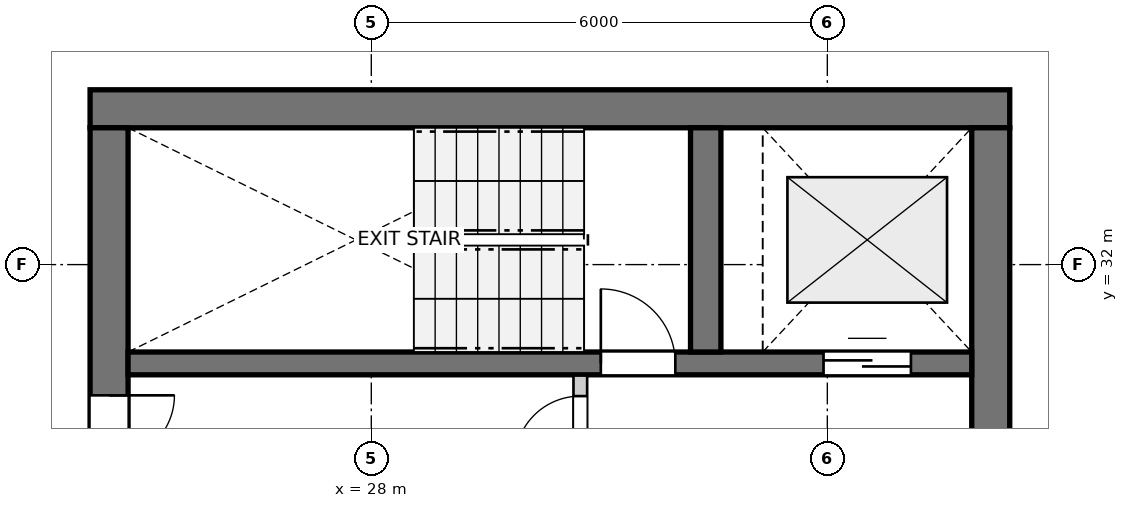
"""IFC4 building model, lengths in metres.
Left out: names, types, materials, properties, quantities, classifications, styles, units other than length and angle.
Written with IfcOpenShell. Run it as: python <this file> out.ifc"""

import sys

from ifc_helpers import new_model, si_unit, direction, frame, frame_2d, origin, place, context, subcontext, project, spatial, rectangle, extrude, source, transform, mapped, element, fill, save


model = new_model("IFC4")
c1 = context("Model", 3, precision=1e-05, world=origin(), true_north=direction((0.0, 1.0)))
c2 = subcontext(c1, "Body", "Model", "MODEL_VIEW")
j1 = project(units=[si_unit("LENGTHUNIT", "METRE"), si_unit("PLANEANGLEUNIT", "RADIAN")], contexts=[c1])
p1 = place(None, origin())
s1 = spatial("IfcSite", under=j1, at=p1, CompositionType="ELEMENT")
p2 = place(p1, origin())
s2 = spatial("IfcBuilding", under=s1, at=p2, CompositionType="ELEMENT")
p3 = place(p2, frame((0.0, 0.0, 224.4)))
s3 = spatial("IfcBuildingStorey", under=s2, at=p3, CompositionType="ELEMENT", Elevation=224.4)
p4 = place(p3, frame((36.4, 34.05, 0.0), z_axis=(0.0, 0.0, 1.0), x_axis=(-1.0, 0.0, 0.0)))
e1 = element("IfcWall", 1, at=p4, inside=s3, PredefinedType="SHEAR", context=c2, shape_type="SweptSolid", body=[
    extrude(rectangle(XDim=12.1, YDim=0.5, at=frame_2d((6.05, 0.0))), origin(), (0.0, 0.0, 1.0), 2.96),
])
p5 = place(p3, frame((24.55, 33.8, 0.0), z_axis=(0.0, 0.0, 1.0), x_axis=(0.0, -1.0, 0.0)))
e2 = element("IfcWall", 2, at=p5, inside=s3, PredefinedType="SHEAR", context=c2, shape_type="SweptSolid", body=[
    extrude(rectangle(XDim=15.6, YDim=0.5, at=frame_2d((7.8, 0.0))), origin(), (0.0, 0.0, 1.0), 2.96),
])
p6 = place(p5, frame((7.05, 0.0, 0.0)))
e3 = element("IfcOpeningElement", 3, at=p6, cuts=e2, PredefinedType="OPENING", context=c2, shape_type="SweptSolid", body=[
    extrude(rectangle(XDim=1.5, YDim=2.15, at=frame_2d((0.75, 1.075))), frame((0.0, 0.26, 0.0), z_axis=(0.0, -1.0, 0.0), x_axis=(1.0, 0.0, 0.0)), (0.0, 0.0, 1.0), 0.52),
])
p7 = place(p5, frame((3.52, 0.0, 0.0)))
e4 = element("IfcOpeningElement", 4, at=p7, cuts=e2, PredefinedType="OPENING", context=c2, shape_type="SweptSolid", body=[
    extrude(rectangle(XDim=0.86, YDim=2.05, at=frame_2d((0.43, 1.025))), frame((0.0, 0.26, 0.0), z_axis=(0.0, -1.0, 0.0), x_axis=(1.0, 0.0, 0.0)), (0.0, 0.0, 1.0), 0.52),
])
p8 = place(p5, frame((11.22, 0.0, 0.0)))
e5 = element("IfcOpeningElement", 5, at=p8, cuts=e2, PredefinedType="OPENING", context=c2, shape_type="SweptSolid", body=[
    extrude(rectangle(XDim=0.86, YDim=2.05, at=frame_2d((0.43, 1.025))), frame((0.0, 0.26, 0.0), z_axis=(0.0, -1.0, 0.0), x_axis=(1.0, 0.0, 0.0)), (0.0, 0.0, 1.0), 0.52),
])
p9 = place(p3, frame((36.15, 18.2, 0.0), z_axis=(0.0, 0.0, 1.0), x_axis=(0.0, 1.0, 0.0)))
e6 = element("IfcWall", 6, at=p9, inside=s3, PredefinedType="SHEAR", context=c2, shape_type="SweptSolid", body=[
    extrude(rectangle(XDim=15.6, YDim=0.5, at=frame_2d((7.8, 0.0))), origin(), (0.0, 0.0, 1.0), 2.96),
])
p10 = place(p9, frame((4.25, 0.0, 0.0)))
e7 = element("IfcOpeningElement", 7, at=p10, cuts=e6, PredefinedType="OPENING", context=c2, shape_type="SweptSolid", body=[
    extrude(rectangle(XDim=1.1, YDim=2.15, at=frame_2d((0.55, 1.075))), frame((0.0, 0.26, 0.0), z_axis=(0.0, -1.0, 0.0), x_axis=(1.0, 0.0, 0.0)), (0.0, 0.0, 1.0), 0.52),
])
p11 = place(p9, frame((10.25, 0.0, 0.0)))
e8 = element("IfcOpeningElement", 8, at=p11, cuts=e6, PredefinedType="OPENING", context=c2, shape_type="SweptSolid", body=[
    extrude(rectangle(XDim=1.1, YDim=2.15, at=frame_2d((0.55, 1.075))), frame((0.0, 0.26, 0.0), z_axis=(0.0, -1.0, 0.0), x_axis=(1.0, 0.0, 0.0)), (0.0, 0.0, 1.0), 0.52),
])
p12 = place(p3, frame((24.8, 30.7, 0.0), z_axis=(0.0, 0.0, 1.0), x_axis=(1.0, 0.0, 0.0)))
e9 = element("IfcWall", 9, at=p12, inside=s3, PredefinedType="SHEAR", context=c2, shape_type="SweptSolid", body=[
    extrude(rectangle(XDim=11.1, YDim=0.3, at=frame_2d((5.55, 0.0))), origin(), (0.0, 0.0, 1.0), 2.96),
])
p13 = place(p12, frame((6.22, 0.0, 0.0)))
e10 = element("IfcOpeningElement", 10, at=p13, cuts=e9, PredefinedType="OPENING", context=c2, shape_type="SweptSolid", body=[
    extrude(rectangle(XDim=0.98, YDim=2.15, at=frame_2d((0.49, 1.075))), frame((0.0, 0.16, 0.0), z_axis=(0.0, -1.0, 0.0), x_axis=(1.0, 0.0, 0.0)), (0.0, 0.0, 1.0), 0.32),
])
p14 = place(p12, frame((9.15, 0.0, 0.0)))
e11 = element("IfcOpeningElement", 11, at=p14, cuts=e9, PredefinedType="OPENING", context=c2, shape_type="SweptSolid", body=[
    extrude(rectangle(XDim=1.15, YDim=2.15, at=frame_2d((0.575, 1.075))), frame((0.0, 0.16, 0.0), z_axis=(0.0, -1.0, 0.0), x_axis=(1.0, 0.0, 0.0)), (0.0, 0.0, 1.0), 0.32),
])
p15 = place(p3, frame((32.4, 30.85, 0.0), z_axis=(0.0, 0.0, 1.0), x_axis=(0.0, 1.0, 0.0)))
e12 = element("IfcWall", 12, at=p15, inside=s3, PredefinedType="SHEAR", context=c2, shape_type="SweptSolid", body=[
    extrude(rectangle(XDim=2.95, YDim=0.4, at=frame_2d((1.475, 0.0))), origin(), (0.0, 0.0, 1.0), 2.96),
])
p16 = place(p3, frame((30.75, 27.43, 0.0), z_axis=(0.0, 0.0, 1.0), x_axis=(0.0, 1.0, 0.0)))
e13 = element("IfcWall", 13, at=p16, inside=s3, PredefinedType="PARTITIONING", context=c2, shape_type="SweptSolid", body=[
    extrude(rectangle(XDim=3.11, YDim=0.18, at=frame_2d((1.555, 0.0))), origin(), (0.0, 0.0, 1.0), 2.96),
])
p17 = place(p16, frame((1.98, 0.0, 0.0)))
e14 = element("IfcOpeningElement", 14, at=p17, cuts=e13, PredefinedType="OPENING", context=c2, shape_type="SweptSolid", body=[
    extrude(rectangle(XDim=0.86, YDim=2.05, at=frame_2d((0.43, 1.025))), frame((0.0, 0.1, 0.0), z_axis=(0.0, -1.0, 0.0), x_axis=(1.0, 0.0, 0.0)), (0.0, 0.0, 1.0), 0.2),
])
m1 = source(origin(), c2, "Body", "SweptSolid", [
    extrude(rectangle(XDim=0.98, YDim=2.15, at=frame_2d((0.49, 1.075))), frame((0.0, 0.025, 0.0), z_axis=(0.0, -1.0, 0.0), x_axis=(1.0, 0.0, 0.0)), (0.0, 0.0, 1.0), 0.05),
])
p18 = place(p13, origin())
e15 = element("IfcDoor", 15, at=p18, inside=s3, OperationType="SINGLE_SWING_LEFT", PredefinedType="DOOR", context=c2, shape_type="MappedRepresentation", body=[
    mapped(m1, transform((0.0, 0.0, 0.0), x_axis=(1.0, 0.0, 0.0), y_axis=(0.0, 1.0, 0.0), z_axis=(0.0, 0.0, 1.0), scale=1.0)),
])
fill(e10, e15)
m2 = source(origin(), c2, "Body", "SweptSolid", [
    extrude(rectangle(XDim=1.15, YDim=2.15, at=frame_2d((0.575, 1.075))), frame((0.0, 0.025, 0.0), z_axis=(0.0, -1.0, 0.0), x_axis=(1.0, 0.0, 0.0)), (0.0, 0.0, 1.0), 0.05),
])
p19 = place(p14, origin())
e16 = element("IfcDoor", 16, at=p19, inside=s3, OperationType="DOUBLE_DOOR_SLIDING", PredefinedType="DOOR", context=c2, shape_type="MappedRepresentation", body=[
    mapped(m2, transform((0.0, 0.0, 0.0), x_axis=(1.0, 0.0, 0.0), y_axis=(0.0, 1.0, 0.0), z_axis=(0.0, 0.0, 1.0), scale=1.0)),
])
fill(e11, e16)
m3 = source(origin(), c2, "Body", "SweptSolid", [
    extrude(rectangle(XDim=0.86, YDim=2.05, at=frame_2d((0.43, 1.025))), frame((0.0, 0.025, 0.0), z_axis=(0.0, -1.0, 0.0), x_axis=(1.0, 0.0, 0.0)), (0.0, 0.0, 1.0), 0.05),
])
p20 = place(p7, origin())
e17 = element("IfcDoor", 17, at=p20, inside=s3, OperationType="SINGLE_SWING_LEFT", PredefinedType="DOOR", context=c2, shape_type="MappedRepresentation", body=[
    mapped(m3, transform((0.0, 0.0, 0.0), x_axis=(1.0, 0.0, 0.0), y_axis=(0.0, 1.0, 0.0), z_axis=(0.0, 0.0, 1.0), scale=1.0)),
])
fill(e4, e17)
p21 = place(p17, origin())
e18 = element("IfcDoor", 18, at=p21, inside=s3, OperationType="SINGLE_SWING_LEFT", PredefinedType="DOOR", context=c2, shape_type="MappedRepresentation", body=[
    mapped(m3, transform((0.0, 0.0, 0.0), x_axis=(1.0, 0.0, 0.0), y_axis=(0.0, 1.0, 0.0), z_axis=(0.0, 0.0, 1.0), scale=1.0)),
])
fill(e14, e18)
save(model, sys.argv[1])
